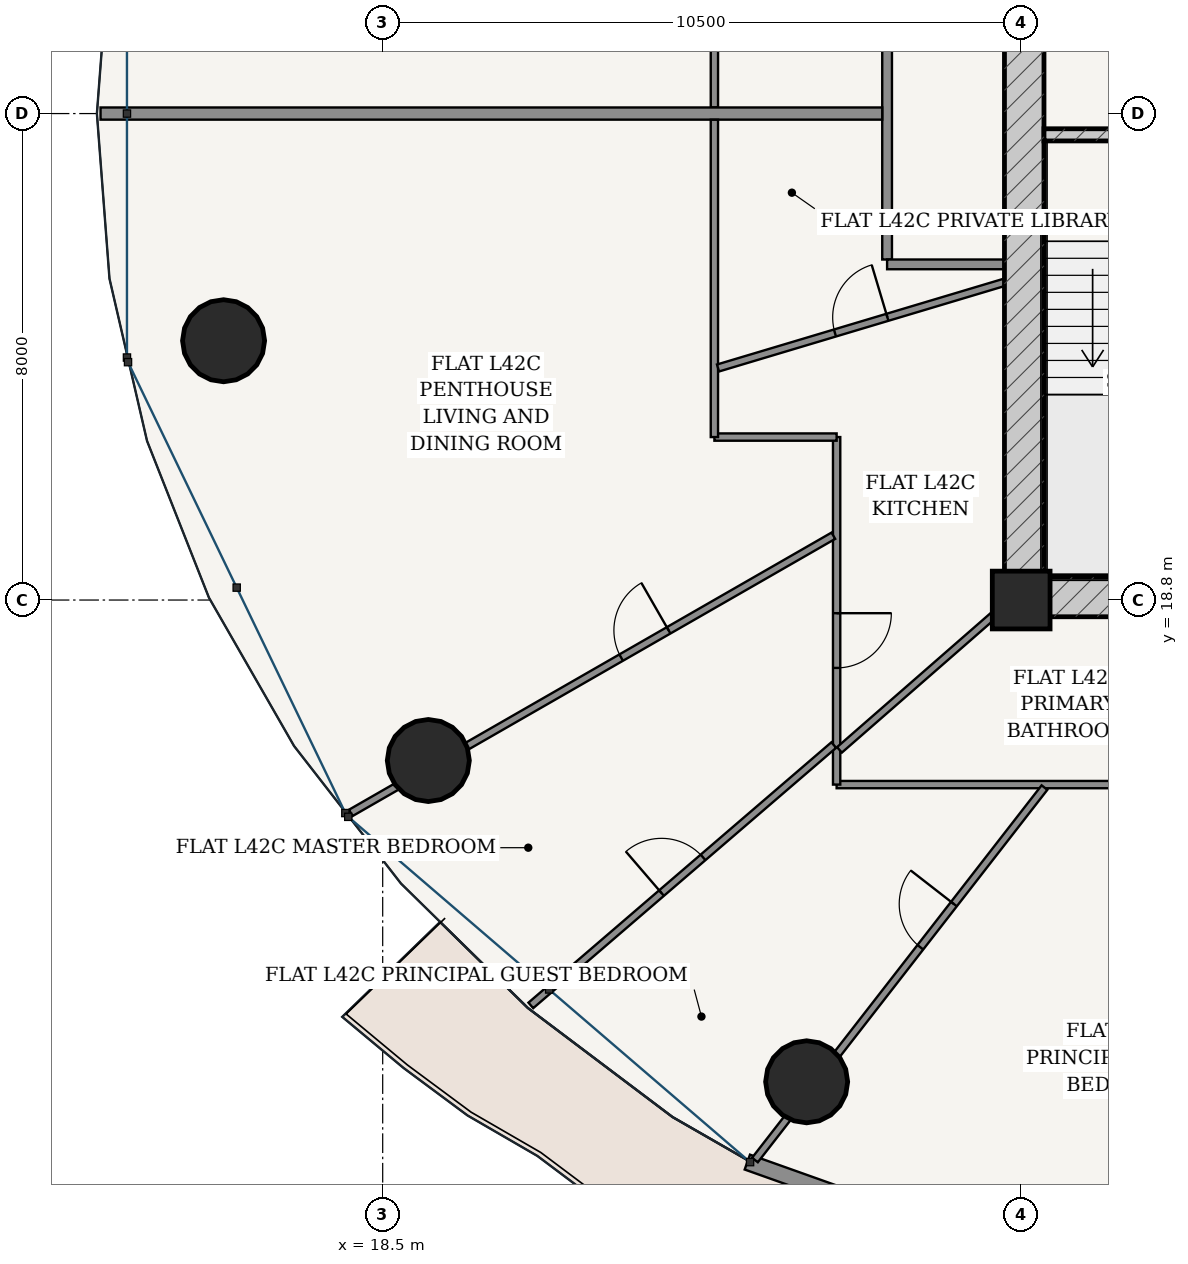
"""IFC4 building model, lengths in metres.
Left out: names, types, materials, properties, quantities, classifications, styles, units other than length and angle.
Written with IfcOpenShell. Run it as: python <this file> out.ifc"""

import sys

from ifc_helpers import new_model, si_unit, direction, frame, frame_2d, origin, origin_2d, place, context, subcontext, project, spatial, rectangle, hollow_circle, extrude, source, transform, mapped, element, fill, save


model = new_model("IFC4")
c1 = context("Model", 3, precision=1e-05, world=origin(), true_north=direction((-0.2419218956, 0.970295726276)))
c2 = subcontext(c1, "Body", "Model", "MODEL_VIEW")
j1 = project(units=[si_unit("LENGTHUNIT", "METRE"), si_unit("PLANEANGLEUNIT", "RADIAN")], contexts=[c1])
p1 = place(None, origin())
s1 = spatial("IfcSite", under=j1, at=p1, CompositionType="ELEMENT")
p2 = place(p1, origin())
s2 = spatial("IfcBuilding", under=s1, at=p2, CompositionType="ELEMENT")
p3 = place(p2, frame((0.0, 0.0, 160.6)))
s3 = spatial("IfcBuildingStorey", under=s2, at=p3, CompositionType="ELEMENT", Elevation=160.6)
p4 = place(p3, frame((29.0, 18.8, 0.0), z_axis=(0.0, 0.0, 1.0), x_axis=(1.0, 0.0, 0.0)))
e1 = element("IfcColumn", 1, at=p4, inside=s3, PredefinedType="COLUMN", context=c2, shape_type="SweptSolid", body=[
    extrude(rectangle(XDim=0.95, YDim=0.95, at=origin_2d()), origin(), (0.0, 0.0, 1.0), 3.6),
])
p5 = place(p3, frame((28.725, 18.85, 0.0), z_axis=(0.0, 0.0, 1.0), x_axis=(1.0, 0.0, 0.0)))
e2 = element("IfcWall", 2, at=p5, inside=s3, PredefinedType="SHEAR", context=c2, shape_type="SweptSolid", body=[
    extrude(rectangle(XDim=18.55, YDim=0.65, at=frame_2d((9.275, 0.0))), origin(), (0.0, 0.0, 1.0), 3.33),
])
p6 = place(p5, frame((8.85, 0.0, 0.0)))
e3 = element("IfcOpeningElement", 3, at=p6, cuts=e2, PredefinedType="OPENING", context=c2, shape_type="SweptSolid", body=[
    extrude(rectangle(XDim=0.85, YDim=2.1, at=frame_2d((0.425, 1.05))), frame((0.0, 0.335, 0.0), z_axis=(0.0, -1.0, 0.0), x_axis=(1.0, 0.0, 0.0)), (0.0, 0.0, 1.0), 0.67),
])
p7 = place(p3, frame((29.05, 19.175, 0.0), z_axis=(0.0, 0.0, 1.0), x_axis=(0.0, 1.0, 0.0)))
e4 = element("IfcWall", 4, at=p7, inside=s3, PredefinedType="SHEAR", context=c2, shape_type="SweptSolid", body=[
    extrude(rectangle(XDim=15.25, YDim=0.65, at=frame_2d((7.625, 0.0))), origin(), (0.0, 0.0, 1.0), 3.33),
])
p8 = place(p7, frame((9.875, 0.0, 0.0)))
e5 = element("IfcOpeningElement", 5, at=p8, cuts=e4, PredefinedType="OPENING", context=c2, shape_type="SweptSolid", body=[
    extrude(rectangle(XDim=1.5, YDim=2.2, at=frame_2d((0.75, 1.1))), frame((0.0, 0.335, 0.0), z_axis=(0.0, -1.0, 0.0), x_axis=(1.0, 0.0, 0.0)), (0.0, 0.0, 1.0), 0.67),
])
p9 = place(p3, frame((29.375, 26.45, 0.0), z_axis=(0.0, 0.0, 1.0), x_axis=(1.0, 0.0, 0.0)))
e6 = element("IfcWall", 6, at=p9, inside=s3, PredefinedType="SOLIDWALL", context=c2, shape_type="SweptSolid", body=[
    extrude(rectangle(XDim=3.32, YDim=0.2, at=frame_2d((1.66, 0.0))), origin(), (0.0, 0.0, 1.0), 3.33),
])
p10 = place(p9, frame((1.185, 0.0, 0.0)))
e7 = element("IfcOpeningElement", 7, at=p10, cuts=e6, PredefinedType="OPENING", context=c2, shape_type="SweptSolid", body=[
    extrude(rectangle(XDim=0.95, YDim=2.15, at=frame_2d((0.475, 1.075))), frame((0.0, 0.11, 0.0), z_axis=(0.0, -1.0, 0.0), x_axis=(1.0, 0.0, 0.0)), (0.0, 0.0, 1.0), 0.22),
])
for number, where, z_axis, x_axis in (
    (8, (15.883, 23.064, 0.0), (0.0, 0.0, 1.0), (1.0, 0.0, 0.0)),
    (9, (19.25, 16.161, 0.0), (0.0, 0.0, 1.0), (1.0, 0.0, 0.0)),
    (10, (25.472, 10.877, 0.0), (0.0, 0.0, 1.0), (1.0, 0.0, 0.0)),
):
    element("IfcColumn", number, at=place(p3, frame(where, z_axis=z_axis, x_axis=x_axis)), inside=s3, PredefinedType="COLUMN", context=c2, shape_type="SweptSolid", body=[
        extrude(hollow_circle(Radius=0.675, WallThickness=0.042, at=origin_2d()), origin(), (0.0, 0.0, 1.0), 3.6),
    ])
p11 = place(p3, frame((24.497, 9.557, 0.0), z_axis=(0.0, 0.0, 1.0), x_axis=(0.942103604331, -0.335321932934, 0.0)))
e11 = element("IfcWall", 11, at=p11, inside=s3, PredefinedType="SOLIDWALL", context=c2, shape_type="SweptSolid", body=[
    extrude(rectangle(XDim=9.408, YDim=0.26, at=frame_2d((4.704, 0.0))), origin(), (0.0, 0.0, 1.0), 3.33),
])
p12 = place(p11, frame((4.029, 0.0, 0.0)))
e12 = element("IfcOpeningElement", 12, at=p12, cuts=e11, PredefinedType="OPENING", context=c2, shape_type="SweptSolid", body=[
    extrude(rectangle(XDim=1.35, YDim=2.2, at=frame_2d((0.675, 1.1))), frame((0.0, 0.14, 0.0), z_axis=(0.0, -1.0, 0.0), x_axis=(1.0, 0.0, 0.0)), (0.0, 0.0, 1.0), 0.28),
])
p13 = place(p3, frame((26.795, 24.4, 0.0), z_axis=(0.0, 0.0, 1.0), x_axis=(0.0, 1.0, 0.0)))
e13 = element("IfcWall", 13, at=p13, inside=s3, PredefinedType="PARTITIONING", context=c2, shape_type="SweptSolid", body=[
    extrude(rectangle(XDim=10.675, YDim=0.16, at=frame_2d((5.337, 0.0))), origin(), (0.0, 0.0, 1.0), 2.776),
])
p14 = place(p13, frame((8.422, 0.0, 0.0)))
e14 = element("IfcOpeningElement", 14, at=p14, cuts=e13, PredefinedType="OPENING", context=c2, shape_type="SweptSolid", body=[
    extrude(rectangle(XDim=0.98, YDim=2.2, at=frame_2d((0.49, 1.1))), frame((0.0, 0.09, 0.0), z_axis=(0.0, -1.0, 0.0), x_axis=(1.0, 0.0, 0.0)), (0.0, 0.0, 1.0), 0.18),
])
p15 = place(p3, frame((26.795, 24.32, 0.0), z_axis=(0.0, 0.0, 1.0), x_axis=(1.0, 0.0, 0.0)))
e15 = element("IfcWall", 15, at=p15, inside=s3, PredefinedType="PARTITIONING", context=c2, shape_type="SweptSolid", body=[
    extrude(rectangle(XDim=1.93, YDim=0.16, at=frame_2d((0.965, 0.0))), origin(), (0.0, 0.0, 1.0), 3.33),
])
p16 = place(p3, frame((23.955, 26.902, 0.0), z_axis=(0.0, 0.0, 1.0), x_axis=(0.0, 1.0, 0.0)))
e16 = element("IfcWall", 16, at=p16, inside=s3, PredefinedType="PARTITIONING", context=c2, shape_type="SweptSolid", body=[
    extrude(rectangle(XDim=11.093, YDim=0.12, at=frame_2d((5.546, 0.0))), origin(), (0.0, 0.0, 1.0), 2.776),
])
p17 = place(p16, frame((7.997, 0.0, 0.0)))
e17 = element("IfcOpeningElement", 17, at=p17, cuts=e16, PredefinedType="OPENING", context=c2, shape_type="SweptSolid", body=[
    extrude(rectangle(XDim=0.9, YDim=2.15, at=frame_2d((0.45, 1.075))), frame((0.0, 0.07, 0.0), z_axis=(0.0, -1.0, 0.0), x_axis=(1.0, 0.0, 0.0)), (0.0, 0.0, 1.0), 0.14),
])
p18 = place(p3, frame((26.715, 26.8, 0.0), z_axis=(0.0, 0.0, 1.0), x_axis=(-1.0, 0.0, 0.0)))
e18 = element("IfcWall", 18, at=p18, inside=s3, PredefinedType="PARTITIONING", context=c2, shape_type="SweptSolid", body=[
    extrude(rectangle(XDim=12.855, YDim=0.2, at=frame_2d((6.427, 0.0))), origin(), (0.0, 0.0, 1.0), 2.846),
])
p19 = place(p3, frame((31.48, 15.765, 0.0), z_axis=(0.0, 0.0, 1.0), x_axis=(-1.0, 0.0, 0.0)))
e19 = element("IfcWall", 19, at=p19, inside=s3, PredefinedType="PARTITIONING", context=c2, shape_type="SweptSolid", body=[
    extrude(rectangle(XDim=5.515, YDim=0.12, at=frame_2d((2.757, 0.0))), origin(), (0.0, 0.0, 1.0), 2.776),
])
p20 = place(p3, frame((25.965, 15.765, 0.0), z_axis=(0.0, 0.0, 1.0), x_axis=(0.0, 1.0, 0.0)))
e20 = element("IfcWall", 20, at=p20, inside=s3, PredefinedType="PARTITIONING", context=c2, shape_type="SweptSolid", body=[
    extrude(rectangle(XDim=5.715, YDim=0.12, at=frame_2d((2.857, 0.0))), origin(), (0.0, 0.0, 1.0), 2.776),
])
p21 = place(p20, frame((1.919, 0.0, 0.0)))
e21 = element("IfcOpeningElement", 21, at=p21, cuts=e20, PredefinedType="OPENING", context=c2, shape_type="SweptSolid", body=[
    extrude(rectangle(XDim=0.9, YDim=2.15, at=frame_2d((0.45, 1.075))), frame((0.0, 0.07, 0.0), z_axis=(0.0, -1.0, 0.0), x_axis=(1.0, 0.0, 0.0)), (0.0, 0.0, 1.0), 0.14),
])
p22 = place(p3, frame((25.965, 21.48, 0.0), z_axis=(0.0, 0.0, 1.0), x_axis=(-1.0, 0.0, 0.0)))
e22 = element("IfcWall", 22, at=p22, inside=s3, PredefinedType="PARTITIONING", context=c2, shape_type="SweptSolid", body=[
    extrude(rectangle(XDim=2.01, YDim=0.12, at=frame_2d((1.005, 0.0))), origin(), (0.0, 0.0, 1.0), 3.33),
])
p23 = place(p3, frame((23.955, 21.48, 0.0), z_axis=(0.0, 0.0, 1.0), x_axis=(0.0, 1.0, 0.0)))
e23 = element("IfcWall", 23, at=p23, inside=s3, PredefinedType="PARTITIONING", context=c2, shape_type="SweptSolid", body=[
    extrude(rectangle(XDim=5.218, YDim=0.12, at=frame_2d((2.609, 0.0))), origin(), (0.0, 0.0, 1.0), 2.776),
])
p24 = place(p3, frame((25.911, 19.857, 0.0), z_axis=(0.0, 0.0, 1.0), x_axis=(-0.867160939672, -0.498028015986, 0.0)))
e24 = element("IfcWall", 24, at=p24, inside=s3, PredefinedType="PARTITIONING", context=c2, shape_type="SweptSolid", body=[
    extrude(rectangle(XDim=9.152, YDim=0.12, at=frame_2d((4.576, 0.0))), origin(), (0.0, 0.0, 1.0), 2.776),
])
p25 = place(p24, frame((3.124, 0.0, 0.0)))
e25 = element("IfcOpeningElement", 25, at=p25, cuts=e24, PredefinedType="OPENING", context=c2, shape_type="SweptSolid", body=[
    extrude(rectangle(XDim=0.9, YDim=2.15, at=frame_2d((0.45, 1.075))), frame((0.0, 0.07, 0.0), z_axis=(0.0, -1.0, 0.0), x_axis=(1.0, 0.0, 0.0)), (0.0, 0.0, 1.0), 0.14),
])
p26 = place(p3, frame((25.918, 16.416, 0.0), z_axis=(0.0, 0.0, 1.0), x_axis=(-0.758356041353, -0.651840559142, 0.0)))
e26 = element("IfcWall", 26, at=p26, inside=s3, PredefinedType="PARTITIONING", context=c2, shape_type="SweptSolid", body=[
    extrude(rectangle(XDim=6.569, YDim=0.12, at=frame_2d((3.285, 0.0))), origin(), (0.0, 0.0, 1.0), 2.846),
])
p27 = place(p26, frame((2.834, 0.0, 0.0)))
e27 = element("IfcOpeningElement", 27, at=p27, cuts=e26, PredefinedType="OPENING", context=c2, shape_type="SweptSolid", body=[
    extrude(rectangle(XDim=0.9, YDim=2.15, at=frame_2d((0.45, 1.075))), frame((0.0, 0.07, 0.0), z_axis=(0.0, -1.0, 0.0), x_axis=(1.0, 0.0, 0.0)), (0.0, 0.0, 1.0), 0.14),
])
p28 = place(p3, frame((29.383, 15.716, 0.0), z_axis=(0.0, 0.0, 1.0), x_axis=(-0.613751061882, -0.789499609904, 0.0)))
e28 = element("IfcWall", 28, at=p28, inside=s3, PredefinedType="PARTITIONING", context=c2, shape_type="SweptSolid", body=[
    extrude(rectangle(XDim=7.758, YDim=0.12, at=frame_2d((3.879, 0.0))), origin(), (0.0, 0.0, 1.0), 2.776),
])
p29 = place(p28, frame((2.426, 0.0, 0.0)))
e29 = element("IfcOpeningElement", 29, at=p29, cuts=e28, PredefinedType="OPENING", context=c2, shape_type="SweptSolid", body=[
    extrude(rectangle(XDim=0.9, YDim=2.15, at=frame_2d((0.45, 1.075))), frame((0.0, 0.07, 0.0), z_axis=(0.0, -1.0, 0.0), x_axis=(1.0, 0.0, 0.0)), (0.0, 0.0, 1.0), 0.14),
])
p30 = place(p3, frame((28.723, 24.025, 0.0), z_axis=(0.0, 0.0, 1.0), x_axis=(-0.958046115523, -0.286614096882, 0.0)))
e30 = element("IfcWall", 30, at=p30, inside=s3, PredefinedType="PARTITIONING", context=c2, shape_type="SweptSolid", body=[
    extrude(rectangle(XDim=4.915, YDim=0.12, at=frame_2d((2.458, 0.0))), origin(), (0.0, 0.0, 1.0), 3.33),
])
p31 = place(p30, frame((2.007, 0.0, 0.0)))
e31 = element("IfcOpeningElement", 31, at=p31, cuts=e30, PredefinedType="OPENING", context=c2, shape_type="SweptSolid", body=[
    extrude(rectangle(XDim=0.9, YDim=2.15, at=frame_2d((0.45, 1.075))), frame((0.0, 0.07, 0.0), z_axis=(0.0, -1.0, 0.0), x_axis=(1.0, 0.0, 0.0)), (0.0, 0.0, 1.0), 0.14),
])
p32 = place(p3, frame((28.588, 18.585, 0.0), z_axis=(0.0, 0.0, 1.0), x_axis=(-0.753380933673, -0.657584343471, 0.0)))
e32 = element("IfcWall", 32, at=p32, inside=s3, PredefinedType="PARTITIONING", context=c2, shape_type="SweptSolid", body=[
    extrude(rectangle(XDim=3.42, YDim=0.12, at=frame_2d((1.71, 0.0))), origin(), (0.0, 0.0, 1.0), 3.005),
])
m1 = source(origin(), c2, "Body", "SweptSolid", [
    extrude(rectangle(XDim=0.9, YDim=2.15, at=frame_2d((0.45, 1.075))), frame((0.0, 0.025, 0.0), z_axis=(0.0, -1.0, 0.0), x_axis=(1.0, 0.0, 0.0)), (0.0, 0.0, 1.0), 0.05),
])
p33 = place(p29, frame((0.9, 0.0, 0.0), z_axis=(0.0, 0.0, 1.0), x_axis=(-1.0, 0.0, 0.0)))
e33 = element("IfcDoor", 33, at=p33, inside=s3, OperationType="SINGLE_SWING_RIGHT", PredefinedType="DOOR", context=c2, shape_type="MappedRepresentation", body=[
    mapped(m1, transform((0.0, 0.0, 0.0), scale=1.0)),
])
fill(e29, e33)
p34 = place(p27, frame((0.9, 0.0, 0.0), z_axis=(0.0, 0.0, 1.0), x_axis=(-1.0, 0.0, 0.0)))
e34 = element("IfcDoor", 34, at=p34, inside=s3, OperationType="SINGLE_SWING_LEFT", PredefinedType="DOOR", context=c2, shape_type="MappedRepresentation", body=[
    mapped(m1, transform((0.0, 0.0, 0.0), scale=1.0)),
])
fill(e27, e34)
p35 = place(p25, frame((0.9, 0.0, 0.0), z_axis=(0.0, 0.0, 1.0), x_axis=(-1.0, 0.0, 0.0)))
e35 = element("IfcDoor", 35, at=p35, inside=s3, OperationType="SINGLE_SWING_RIGHT", PredefinedType="DOOR", context=c2, shape_type="MappedRepresentation", body=[
    mapped(m1, transform((0.0, 0.0, 0.0), scale=1.0)),
])
fill(e25, e35)
p36 = place(p21, frame((0.9, 0.0, 0.0), z_axis=(0.0, 0.0, 1.0), x_axis=(-1.0, 0.0, 0.0)))
e36 = element("IfcDoor", 36, at=p36, inside=s3, OperationType="SINGLE_SWING_LEFT", PredefinedType="DOOR", context=c2, shape_type="MappedRepresentation", body=[
    mapped(m1, transform((0.0, 0.0, 0.0), scale=1.0)),
])
fill(e21, e36)
p37 = place(p31, frame((0.9, 0.0, 0.0), z_axis=(0.0, 0.0, 1.0), x_axis=(-1.0, 0.0, 0.0)))
e37 = element("IfcDoor", 37, at=p37, inside=s3, OperationType="SINGLE_SWING_RIGHT", PredefinedType="DOOR", context=c2, shape_type="MappedRepresentation", body=[
    mapped(m1, transform((0.0, 0.0, 0.0), scale=1.0)),
])
fill(e31, e37)
save(model, sys.argv[1])
